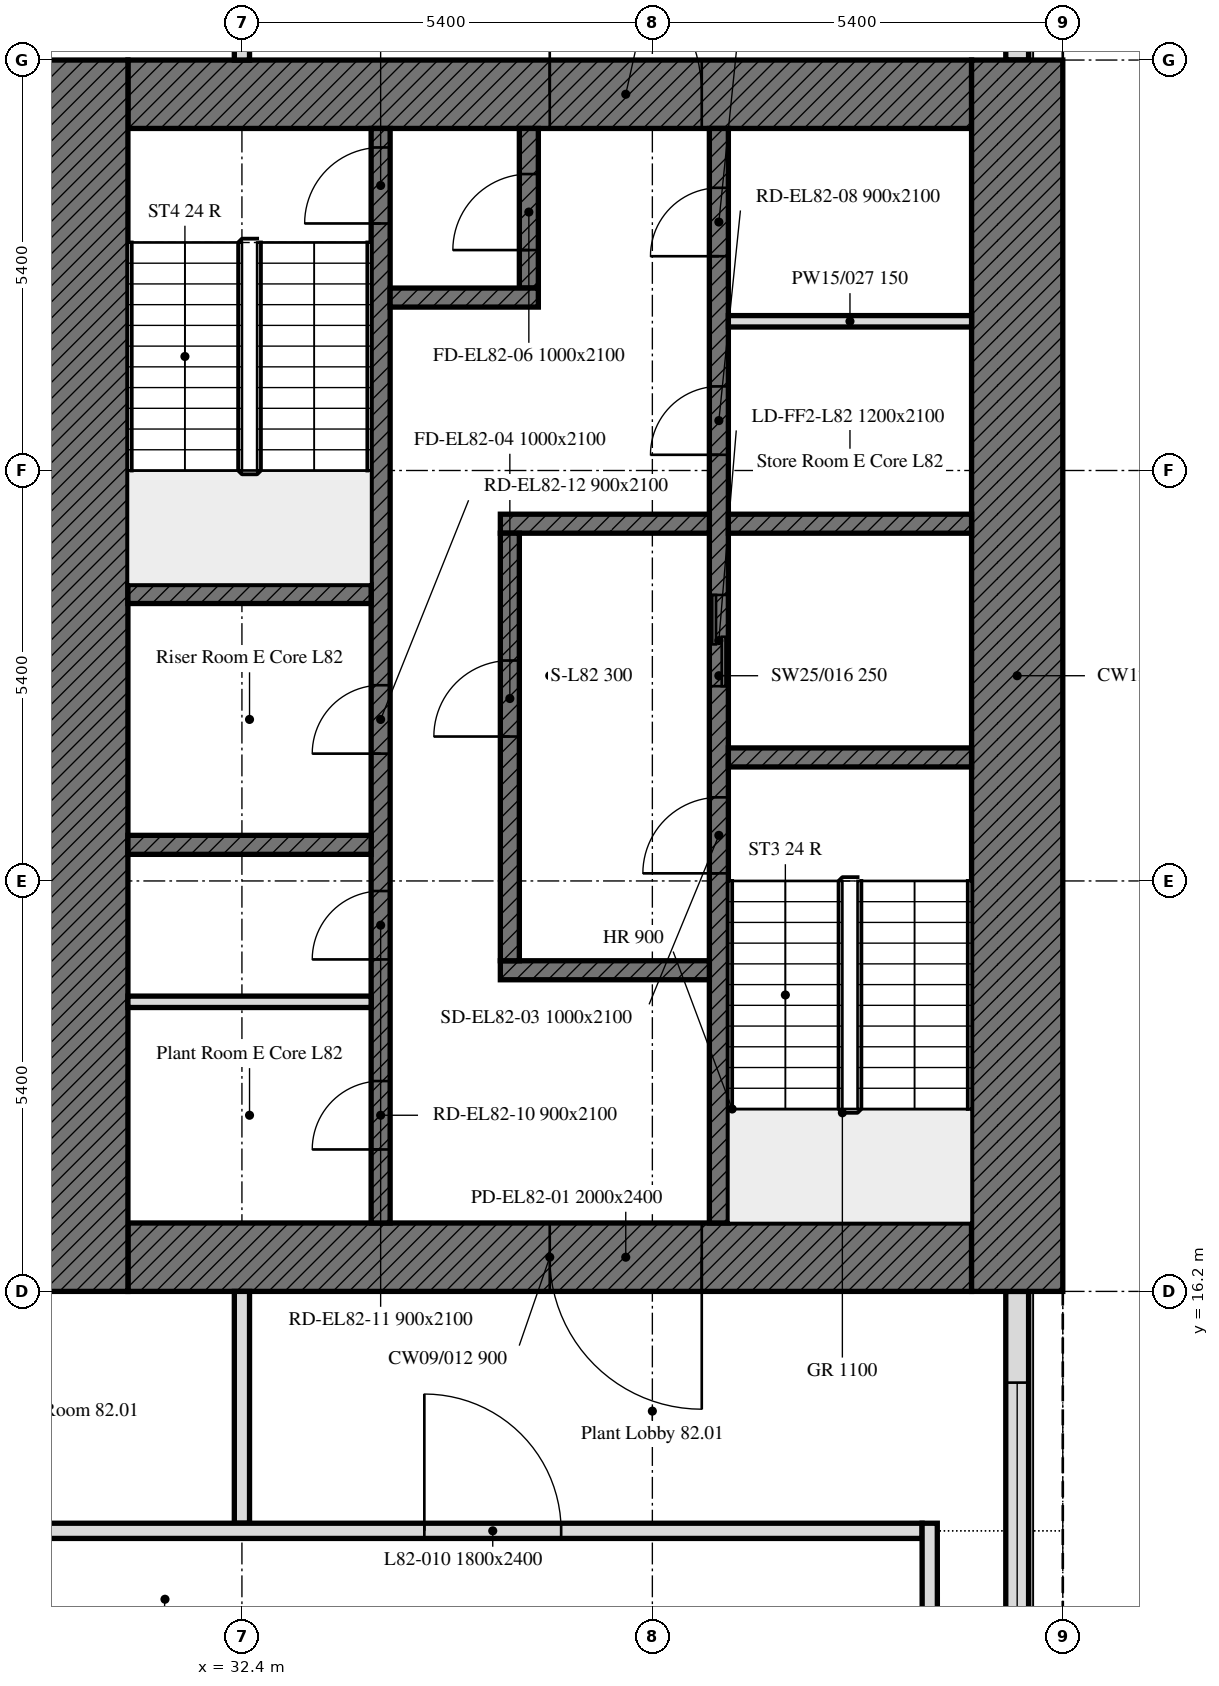
"""IFC4 building model, lengths in metres.
Left out: names, types, materials, properties, quantities, classifications, styles, units other than length and angle.
Written with IfcOpenShell. Run it as: python <this file> out.ifc"""

import sys

from ifc_helpers import new_model, si_unit, direction, frame, frame_2d, origin, place, context, subcontext, project, spatial, polyline, rectangle, outline, extrude, element, fill, save


model = new_model("IFC4")
c1 = context("Model", 3, precision=1e-05, world=origin(), true_north=direction((0.0, 1.0)))
c2 = subcontext(c1, "Body", "Model", "MODEL_VIEW")
j1 = project(units=[si_unit("LENGTHUNIT", "METRE"), si_unit("PLANEANGLEUNIT", "RADIAN")], contexts=[c1])
p1 = place(None, origin())
s1 = spatial("IfcSite", under=j1, at=p1, CompositionType="ELEMENT")
p2 = place(p1, origin())
s2 = spatial("IfcBuilding", under=s1, at=p2, CompositionType="ELEMENT")
p3 = place(p2, frame((0.0, 0.0, 330.7)))
s3 = spatial("IfcBuildingStorey", under=s2, at=p3, CompositionType="ELEMENT", Elevation=330.7)
p4 = place(p3, frame((42.6, 10.986, 0.0), z_axis=(0.0, 0.0, 1.0), x_axis=(0.0, 1.0, 0.0)))
e1 = element("IfcWall", 1, at=p4, inside=s3, PredefinedType="SOLIDWALL", context=c2, shape_type="SweptSolid", body=[
    extrude(outline(polyline([(0.0, 0.0), (5.214, 0.0), (5.214, 4.2), (4.634, 4.2), (4.055, 4.2), (3.476, 4.2), (2.896, 4.2), (2.317, 4.2), (1.738, 4.2), (1.159, 4.2), (0.579, 4.2), (0.0, 4.2), (0.0, 0.0)])), frame((0.0, 0.15, 0.0), z_axis=(0.0, -1.0, 0.0), x_axis=(1.0, 0.0, 0.0)), (0.0, 0.0, 1.0), 0.3),
])
p5 = place(p4, frame((1.014, 0.0, 0.6)))
e2 = element("IfcOpeningElement", 2, at=p5, cuts=e1, PredefinedType="OPENING", context=c2, shape_type="SweptSolid", body=[
    extrude(rectangle(XDim=3.0, YDim=1.8, at=frame_2d((1.5, 0.9))), frame((0.0, 0.16, 0.0), z_axis=(0.0, -1.0, 0.0), x_axis=(1.0, 0.0, 0.0)), (0.0, 0.0, 1.0), 0.32),
])
p6 = place(p3, frame((42.6, 32.4, 0.0), z_axis=(0.0, 0.0, 1.0), x_axis=(0.0, 1.0, 0.0)))
e3 = element("IfcWall", 3, at=p6, inside=s3, PredefinedType="SOLIDWALL", context=c2, shape_type="SweptSolid", body=[
    extrude(outline(polyline([(0.0, 0.0), (10.614, 0.0), (10.614, 4.2), (10.024, 4.2), (9.434, 4.2), (8.845, 4.2), (8.255, 4.2), (7.665, 4.2), (7.076, 4.2), (6.486, 4.2), (5.896, 4.2), (5.307, 4.2), (4.717, 4.2), (4.127, 4.2), (3.538, 4.2), (2.948, 4.2), (2.359, 4.2), (1.769, 4.2), (1.179, 4.2), (0.59, 4.2), (0.0, 4.2), (0.0, 0.0)])), frame((0.0, 0.15, 0.0), z_axis=(0.0, -1.0, 0.0), x_axis=(1.0, 0.0, 0.0)), (0.0, 0.0, 1.0), 0.3),
])
p7 = place(p6, frame((1.2, 0.0, 0.6)))
e4 = element("IfcOpeningElement", 4, at=p7, cuts=e3, PredefinedType="OPENING", context=c2, shape_type="SweptSolid", body=[
    extrude(rectangle(XDim=3.0, YDim=1.8, at=frame_2d((1.5, 0.9))), frame((0.0, 0.16, 0.0), z_axis=(0.0, -1.0, 0.0), x_axis=(1.0, 0.0, 0.0)), (0.0, 0.0, 1.0), 0.32),
])
p8 = place(p6, frame((7.396, 0.0, 0.6)))
e5 = element("IfcOpeningElement", 5, at=p8, cuts=e3, PredefinedType="OPENING", context=c2, shape_type="SweptSolid", body=[
    extrude(rectangle(XDim=1.4, YDim=1.8, at=frame_2d((0.7, 0.9))), frame((0.0, 0.16, 0.0), z_axis=(0.0, -1.0, 0.0), x_axis=(1.0, 0.0, 0.0)), (0.0, 0.0, 1.0), 0.32),
])
p9 = place(p3, frame((42.0, 16.65, 0.0), z_axis=(0.0, 0.0, 1.0), x_axis=(-1.0, 0.0, 0.0)))
e6 = element("IfcWall", 6, at=p9, inside=s3, PredefinedType="SOLIDWALL", context=c2, shape_type="SweptSolid", body=[
    extrude(rectangle(XDim=11.1, YDim=0.9, at=frame_2d((5.55, 0.0))), origin(), (0.0, 0.0, 1.0), 4.2),
])
p10 = place(p9, frame((3.55, 0.0, 0.0)))
e7 = element("IfcOpeningElement", 7, at=p10, cuts=e6, PredefinedType="OPENING", context=c2, shape_type="SweptSolid", body=[
    extrude(rectangle(XDim=2.0, YDim=2.4, at=frame_2d((1.0, 1.2))), frame((0.0, 0.45, 0.0), z_axis=(0.0, -1.0, 0.0), x_axis=(1.0, 0.0, 0.0)), (0.0, 0.0, 1.0), 0.9),
])
p11 = place(p3, frame((30.9, 31.95, 0.0), z_axis=(0.0, 0.0, 1.0), x_axis=(1.0, 0.0, 0.0)))
e8 = element("IfcWall", 8, at=p11, inside=s3, PredefinedType="SOLIDWALL", context=c2, shape_type="SweptSolid", body=[
    extrude(rectangle(XDim=11.1, YDim=0.9, at=frame_2d((5.55, 0.0))), origin(), (0.0, 0.0, 1.0), 4.2),
])
p12 = place(p11, frame((5.55, 0.0, 0.0)))
e9 = element("IfcOpeningElement", 9, at=p12, cuts=e8, PredefinedType="OPENING", context=c2, shape_type="SweptSolid", body=[
    extrude(rectangle(XDim=2.0, YDim=2.4, at=frame_2d((1.0, 1.2))), frame((0.0, 0.45, 0.0), z_axis=(0.0, -1.0, 0.0), x_axis=(1.0, 0.0, 0.0)), (0.0, 0.0, 1.0), 0.9),
])
for number, where, z_axis, x_axis in (
    (10, (42.6, 32.4, 0.0), (0.0, 0.0, 1.0), (0.0, -1.0, 0.0)),
    (11, (30.3, 16.2, 0.0), (0.0, 0.0, 1.0), (0.0, 1.0, 0.0)),
):
    element("IfcWall", number, at=place(p3, frame(where, z_axis=z_axis, x_axis=x_axis)), inside=s3, PredefinedType="SOLIDWALL", context=c2, shape_type="SweptSolid", body=[
        extrude(rectangle(XDim=16.2, YDim=1.2, at=frame_2d((8.1, 0.0))), origin(), (0.0, 0.0, 1.0), 4.2),
    ])
p13 = place(p3, frame((38.675, 17.1, 0.0), z_axis=(0.0, 0.0, 1.0), x_axis=(0.0, 1.0, 0.0)))
e12 = element("IfcWall", 12, at=p13, inside=s3, PredefinedType="SOLIDWALL", context=c2, shape_type="SweptSolid", body=[
    extrude(rectangle(XDim=14.4, YDim=0.25, at=frame_2d((7.2, 0.0))), origin(), (0.0, 0.0, 1.0), 4.2),
])
p14 = place(p13, frame((4.6, 0.0, 0.0)))
e13 = element("IfcOpeningElement", 13, at=p14, cuts=e12, PredefinedType="OPENING", context=c2, shape_type="SweptSolid", body=[
    extrude(rectangle(XDim=1.0, YDim=2.1, at=frame_2d((0.5, 1.05))), frame((0.0, 0.125, 0.0), z_axis=(0.0, -1.0, 0.0), x_axis=(1.0, 0.0, 0.0)), (0.0, 0.0, 1.0), 0.25),
])
p15 = place(p13, frame((7.062, 0.0, 0.0)))
e14 = element("IfcOpeningElement", 14, at=p15, cuts=e12, PredefinedType="OPENING", context=c2, shape_type="SweptSolid", body=[
    extrude(rectangle(XDim=1.2, YDim=2.1, at=frame_2d((0.6, 1.05))), frame((0.0, 0.125, 0.0), z_axis=(0.0, -1.0, 0.0), x_axis=(1.0, 0.0, 0.0)), (0.0, 0.0, 1.0), 0.25),
])
p16 = place(p13, frame((10.106, 0.0, 0.0)))
e15 = element("IfcOpeningElement", 15, at=p16, cuts=e12, PredefinedType="OPENING", context=c2, shape_type="SweptSolid", body=[
    extrude(rectangle(XDim=0.9, YDim=2.1, at=frame_2d((0.45, 1.05))), frame((0.0, 0.125, 0.0), z_axis=(0.0, -1.0, 0.0), x_axis=(1.0, 0.0, 0.0)), (0.0, 0.0, 1.0), 0.25),
])
p17 = place(p13, frame((12.719, 0.0, 0.0)))
e16 = element("IfcOpeningElement", 16, at=p17, cuts=e12, PredefinedType="OPENING", context=c2, shape_type="SweptSolid", body=[
    extrude(rectangle(XDim=0.9, YDim=2.1, at=frame_2d((0.45, 1.05))), frame((0.0, 0.125, 0.0), z_axis=(0.0, -1.0, 0.0), x_axis=(1.0, 0.0, 0.0)), (0.0, 0.0, 1.0), 0.25),
])
p18 = place(p3, frame((34.225, 17.1, 0.0), z_axis=(0.0, 0.0, 1.0), x_axis=(0.0, 1.0, 0.0)))
e17 = element("IfcWall", 17, at=p18, inside=s3, PredefinedType="SOLIDWALL", context=c2, shape_type="SweptSolid", body=[
    extrude(rectangle(XDim=14.4, YDim=0.25, at=frame_2d((7.2, 0.0))), origin(), (0.0, 0.0, 1.0), 4.2),
])
p19 = place(p18, frame((13.15, 0.0, 0.0)))
e18 = element("IfcOpeningElement", 18, at=p19, cuts=e17, PredefinedType="OPENING", context=c2, shape_type="SweptSolid", body=[
    extrude(rectangle(XDim=1.0, YDim=2.1, at=frame_2d((0.5, 1.05))), frame((0.0, 0.125, 0.0), z_axis=(0.0, -1.0, 0.0), x_axis=(1.0, 0.0, 0.0)), (0.0, 0.0, 1.0), 0.25),
])
p20 = place(p18, frame((0.968, 0.0, 0.0)))
e19 = element("IfcOpeningElement", 19, at=p20, cuts=e17, PredefinedType="OPENING", context=c2, shape_type="SweptSolid", body=[
    extrude(rectangle(XDim=0.9, YDim=2.1, at=frame_2d((0.45, 1.05))), frame((0.0, 0.125, 0.0), z_axis=(0.0, -1.0, 0.0), x_axis=(1.0, 0.0, 0.0)), (0.0, 0.0, 1.0), 0.25),
])
p21 = place(p18, frame((3.468, 0.0, 0.0)))
e20 = element("IfcOpeningElement", 20, at=p21, cuts=e17, PredefinedType="OPENING", context=c2, shape_type="SweptSolid", body=[
    extrude(rectangle(XDim=0.9, YDim=2.1, at=frame_2d((0.45, 1.05))), frame((0.0, 0.125, 0.0), z_axis=(0.0, -1.0, 0.0), x_axis=(1.0, 0.0, 0.0)), (0.0, 0.0, 1.0), 0.25),
])
p22 = place(p18, frame((6.175, 0.0, 0.0)))
e21 = element("IfcOpeningElement", 21, at=p22, cuts=e17, PredefinedType="OPENING", context=c2, shape_type="SweptSolid", body=[
    extrude(rectangle(XDim=0.9, YDim=2.1, at=frame_2d((0.45, 1.05))), frame((0.0, 0.125, 0.0), z_axis=(0.0, -1.0, 0.0), x_axis=(1.0, 0.0, 0.0)), (0.0, 0.0, 1.0), 0.25),
])
p23 = place(p3, frame((38.8, 23.225, 0.0), z_axis=(0.0, 0.0, 1.0), x_axis=(1.0, 0.0, 0.0)))
e22 = element("IfcWall", 22, at=p23, inside=s3, PredefinedType="SOLIDWALL", context=c2, shape_type="SweptSolid", body=[
    extrude(rectangle(XDim=3.2, YDim=0.25, at=frame_2d((1.6, 0.0))), origin(), (0.0, 0.0, 1.0), 4.2),
])
for number, where, z_axis, x_axis in (
    (23, (30.9, 25.375, 0.0), (0.0, 0.0, 1.0), (1.0, 0.0, 0.0)),
    (24, (30.9, 22.075, 0.0), (0.0, 0.0, 1.0), (1.0, 0.0, 0.0)),
):
    element("IfcWall", number, at=place(p3, frame(where, z_axis=z_axis, x_axis=x_axis)), inside=s3, PredefinedType="SOLIDWALL", context=c2, shape_type="SweptSolid", body=[
        extrude(rectangle(XDim=3.2, YDim=0.25, at=frame_2d((1.6, 0.0))), origin(), (0.0, 0.0, 1.0), 4.2),
    ])
p24 = place(p3, frame((38.8, 26.3, 0.0), z_axis=(0.0, 0.0, 1.0), x_axis=(1.0, 0.0, 0.0)))
e25 = element("IfcWall", 25, at=p24, inside=s3, PredefinedType="SOLIDWALL", context=c2, shape_type="SweptSolid", body=[
    extrude(rectangle(XDim=3.2, YDim=0.25, at=frame_2d((1.6, 0.0))), origin(), (0.0, 0.0, 1.0), 4.2),
])
for number, where, z_axis, x_axis in (
    (26, (35.8, 26.3, 0.0), (0.0, 0.0, 1.0), (1.0, 0.0, 0.0)),
    (27, (35.8, 20.425, 0.0), (0.0, 0.0, 1.0), (1.0, 0.0, 0.0)),
):
    element("IfcWall", number, at=place(p3, frame(where, z_axis=z_axis, x_axis=x_axis)), inside=s3, PredefinedType="SOLIDWALL", context=c2, shape_type="SweptSolid", body=[
        extrude(rectangle(XDim=2.75, YDim=0.25, at=frame_2d((1.375, 0.0))), origin(), (0.0, 0.0, 1.0), 4.2),
    ])
p25 = place(p3, frame((36.175, 29.4, 0.0), z_axis=(0.0, 0.0, 1.0), x_axis=(0.0, 1.0, 0.0)))
e28 = element("IfcWall", 28, at=p25, inside=s3, PredefinedType="SOLIDWALL", context=c2, shape_type="SweptSolid", body=[
    extrude(rectangle(XDim=2.1, YDim=0.25, at=frame_2d((1.05, 0.0))), origin(), (0.0, 0.0, 1.0), 4.2),
])
p26 = place(p25, frame((0.5, 0.0, 0.0)))
e29 = element("IfcOpeningElement", 29, at=p26, cuts=e28, PredefinedType="OPENING", context=c2, shape_type="SweptSolid", body=[
    extrude(rectangle(XDim=1.0, YDim=2.1, at=frame_2d((0.5, 1.05))), frame((0.0, 0.125, 0.0), z_axis=(0.0, -1.0, 0.0), x_axis=(1.0, 0.0, 0.0)), (0.0, 0.0, 1.0), 0.25),
])
p27 = place(p3, frame((34.35, 29.275, 0.0), z_axis=(0.0, 0.0, 1.0), x_axis=(1.0, 0.0, 0.0)))
e30 = element("IfcWall", 30, at=p27, inside=s3, PredefinedType="SOLIDWALL", context=c2, shape_type="SweptSolid", body=[
    extrude(rectangle(XDim=1.95, YDim=0.25, at=frame_2d((0.975, 0.0))), origin(), (0.0, 0.0, 1.0), 4.2),
])
p28 = place(p3, frame((35.925, 20.55, 0.0), z_axis=(0.0, 0.0, 1.0), x_axis=(0.0, 1.0, 0.0)))
e31 = element("IfcWall", 31, at=p28, inside=s3, PredefinedType="SOLIDWALL", context=c2, shape_type="SweptSolid", body=[
    extrude(rectangle(XDim=5.625, YDim=0.25, at=frame_2d((2.812, 0.0))), origin(), (0.0, 0.0, 1.0), 4.2),
])
p29 = place(p28, frame((2.95, 0.0, 0.0)))
e32 = element("IfcOpeningElement", 32, at=p29, cuts=e31, PredefinedType="OPENING", context=c2, shape_type="SweptSolid", body=[
    extrude(rectangle(XDim=1.0, YDim=2.1, at=frame_2d((0.5, 1.05))), frame((0.0, 0.125, 0.0), z_axis=(0.0, -1.0, 0.0), x_axis=(1.0, 0.0, 0.0)), (0.0, 0.0, 1.0), 0.25),
])
p30 = place(p3, frame((38.8, 28.963, 0.0), z_axis=(0.0, 0.0, 1.0), x_axis=(1.0, 0.0, 0.0)))
e33 = element("IfcWall", 33, at=p30, inside=s3, PredefinedType="PARTITIONING", context=c2, shape_type="SweptSolid", body=[
    extrude(rectangle(XDim=3.2, YDim=0.15, at=frame_2d((1.6, 0.0))), origin(), (0.0, 0.0, 1.0), 4.2),
])
p31 = place(p3, frame((30.9, 20.01, 0.0), z_axis=(0.0, 0.0, 1.0), x_axis=(1.0, 0.0, 0.0)))
e34 = element("IfcWall", 34, at=p31, inside=s3, PredefinedType="PARTITIONING", context=c2, shape_type="SweptSolid", body=[
    extrude(rectangle(XDim=3.2, YDim=0.15, at=frame_2d((1.6, 0.0))), origin(), (0.0, 0.0, 1.0), 4.2),
])
p32 = place(p3, frame((32.4, 32.4, 0.0), z_axis=(0.0, 0.0, 1.0), x_axis=(0.0, 1.0, 0.0)))
e35 = element("IfcWall", 35, at=p32, inside=s3, PredefinedType="PARTITIONING", context=c2, shape_type="SweptSolid", body=[
    extrude(rectangle(XDim=5.105, YDim=0.2, at=frame_2d((2.552, 0.0))), origin(), (0.0, 0.0, 1.0), 3.45),
])
p33 = place(p3, frame((32.4, 13.15, 0.0), z_axis=(0.0, 0.0, 1.0), x_axis=(0.0, 1.0, 0.0)))
e36 = element("IfcWall", 36, at=p33, inside=s3, PredefinedType="PARTITIONING", context=c2, shape_type="SweptSolid", body=[
    extrude(rectangle(XDim=3.05, YDim=0.2, at=frame_2d((1.525, 0.0))), origin(), (0.0, 0.0, 1.0), 4.2),
])
p34 = place(p3, frame((29.7, 13.05, 0.0), z_axis=(0.0, 0.0, 1.0), x_axis=(1.0, 0.0, 0.0)))
e37 = element("IfcWall", 37, at=p34, inside=s3, PredefinedType="PARTITIONING", context=c2, shape_type="SweptSolid", body=[
    extrude(rectangle(XDim=11.649, YDim=0.2, at=frame_2d((5.825, 0.0))), origin(), (0.0, 0.0, 1.0), 4.2),
])
p35 = place(p34, frame((5.1, 0.0, 0.0)))
e38 = element("IfcOpeningElement", 38, at=p35, cuts=e37, PredefinedType="OPENING", context=c2, shape_type="SweptSolid", body=[
    extrude(rectangle(XDim=1.8, YDim=2.4, at=frame_2d((0.9, 1.2))), frame((0.0, 0.1, 0.0), z_axis=(0.0, -1.0, 0.0), x_axis=(1.0, 0.0, 0.0)), (0.0, 0.0, 1.0), 0.2),
])
p36 = place(p3, frame((41.449, 13.15, 0.0), z_axis=(0.0, 0.0, 1.0), x_axis=(0.00085543168, -0.999999634118, 0.0)))
e39 = element("IfcWall", 39, at=p36, inside=s3, PredefinedType="PARTITIONING", context=c2, shape_type="SweptSolid", body=[
    extrude(rectangle(XDim=1.427, YDim=0.2, at=frame_2d((0.713, 0.0))), origin(), (0.0, 0.0, 1.0), 4.2),
])
p37 = place(p5, origin())
e40 = element("IfcWindow", 40, at=p37, inside=s3, PartitioningType="SINGLE_PANEL", PredefinedType="WINDOW", context=c2, shape_type="SweptSolid", body=[
    extrude(rectangle(XDim=3.0, YDim=1.8, at=frame_2d((1.5, 0.9))), frame((0.0, 0.03, 0.0), z_axis=(0.0, -1.0, 0.0), x_axis=(1.0, 0.0, 0.0)), (0.0, 0.0, 1.0), 0.06),
])
fill(e2, e40)
p38 = place(p10, origin())
e41 = element("IfcDoor", 41, at=p38, inside=s3, OperationType="DOUBLE_DOOR_SINGLE_SWING", PredefinedType="DOOR", context=c2, shape_type="SweptSolid", body=[
    extrude(rectangle(XDim=2.0, YDim=2.4, at=frame_2d((1.0, 1.2))), frame((0.0, 0.025, 0.0), z_axis=(0.0, -1.0, 0.0), x_axis=(1.0, 0.0, 0.0)), (0.0, 0.0, 1.0), 0.05),
])
fill(e7, e41)
p39 = place(p12, origin())
e42 = element("IfcDoor", 42, at=p39, inside=s3, OperationType="DOUBLE_DOOR_SINGLE_SWING", PredefinedType="DOOR", context=c2, shape_type="SweptSolid", body=[
    extrude(rectangle(XDim=2.0, YDim=2.4, at=frame_2d((1.0, 1.2))), frame((0.0, 0.025, 0.0), z_axis=(0.0, -1.0, 0.0), x_axis=(1.0, 0.0, 0.0)), (0.0, 0.0, 1.0), 0.05),
])
fill(e9, e42)
p40 = place(p14, origin())
e43 = element("IfcDoor", 43, at=p40, inside=s3, OperationType="SINGLE_SWING_LEFT", PredefinedType="DOOR", context=c2, shape_type="SweptSolid", body=[
    extrude(rectangle(XDim=1.0, YDim=2.1, at=frame_2d((0.5, 1.05))), frame((0.0, 0.025, 0.0), z_axis=(0.0, -1.0, 0.0), x_axis=(1.0, 0.0, 0.0)), (0.0, 0.0, 1.0), 0.05),
])
fill(e13, e43)
p41 = place(p29, origin())
e44 = element("IfcDoor", 44, at=p41, inside=s3, OperationType="SINGLE_SWING_LEFT", PredefinedType="DOOR", context=c2, shape_type="SweptSolid", body=[
    extrude(rectangle(XDim=1.0, YDim=2.1, at=frame_2d((0.5, 1.05))), frame((0.0, 0.025, 0.0), z_axis=(0.0, -1.0, 0.0), x_axis=(1.0, 0.0, 0.0)), (0.0, 0.0, 1.0), 0.05),
])
fill(e32, e44)
p42 = place(p19, origin())
e45 = element("IfcDoor", 45, at=p42, inside=s3, OperationType="SINGLE_SWING_LEFT", PredefinedType="DOOR", context=c2, shape_type="SweptSolid", body=[
    extrude(rectangle(XDim=1.0, YDim=2.1, at=frame_2d((0.5, 1.05))), frame((0.0, 0.025, 0.0), z_axis=(0.0, -1.0, 0.0), x_axis=(1.0, 0.0, 0.0)), (0.0, 0.0, 1.0), 0.05),
])
fill(e18, e45)
p43 = place(p26, origin())
e46 = element("IfcDoor", 46, at=p43, inside=s3, OperationType="SINGLE_SWING_LEFT", PredefinedType="DOOR", context=c2, shape_type="SweptSolid", body=[
    extrude(rectangle(XDim=1.0, YDim=2.1, at=frame_2d((0.5, 1.05))), frame((0.0, 0.025, 0.0), z_axis=(0.0, -1.0, 0.0), x_axis=(1.0, 0.0, 0.0)), (0.0, 0.0, 1.0), 0.05),
])
fill(e29, e46)
p44 = place(p15, origin())
e47 = element("IfcDoor", 47, at=p44, inside=s3, OperationType="DOUBLE_DOOR_SLIDING", PredefinedType="DOOR", context=c2, shape_type="SweptSolid", body=[
    extrude(rectangle(XDim=1.2, YDim=2.1, at=frame_2d((0.6, 1.05))), frame((0.0, 0.025, 0.0), z_axis=(0.0, -1.0, 0.0), x_axis=(1.0, 0.0, 0.0)), (0.0, 0.0, 1.0), 0.05),
])
fill(e14, e47)
p45 = place(p16, origin())
e48 = element("IfcDoor", 48, at=p45, inside=s3, OperationType="SINGLE_SWING_LEFT", PredefinedType="DOOR", context=c2, shape_type="SweptSolid", body=[
    extrude(rectangle(XDim=0.9, YDim=2.1, at=frame_2d((0.45, 1.05))), frame((0.0, 0.025, 0.0), z_axis=(0.0, -1.0, 0.0), x_axis=(1.0, 0.0, 0.0)), (0.0, 0.0, 1.0), 0.05),
])
fill(e15, e48)
p46 = place(p17, origin())
e49 = element("IfcDoor", 49, at=p46, inside=s3, OperationType="SINGLE_SWING_LEFT", PredefinedType="DOOR", context=c2, shape_type="SweptSolid", body=[
    extrude(rectangle(XDim=0.9, YDim=2.1, at=frame_2d((0.45, 1.05))), frame((0.0, 0.025, 0.0), z_axis=(0.0, -1.0, 0.0), x_axis=(1.0, 0.0, 0.0)), (0.0, 0.0, 1.0), 0.05),
])
fill(e16, e49)
p47 = place(p20, origin())
e50 = element("IfcDoor", 50, at=p47, inside=s3, OperationType="SINGLE_SWING_LEFT", PredefinedType="DOOR", context=c2, shape_type="SweptSolid", body=[
    extrude(rectangle(XDim=0.9, YDim=2.1, at=frame_2d((0.45, 1.05))), frame((0.0, 0.025, 0.0), z_axis=(0.0, -1.0, 0.0), x_axis=(1.0, 0.0, 0.0)), (0.0, 0.0, 1.0), 0.05),
])
fill(e19, e50)
p48 = place(p21, origin())
e51 = element("IfcDoor", 51, at=p48, inside=s3, OperationType="SINGLE_SWING_LEFT", PredefinedType="DOOR", context=c2, shape_type="SweptSolid", body=[
    extrude(rectangle(XDim=0.9, YDim=2.1, at=frame_2d((0.45, 1.05))), frame((0.0, 0.025, 0.0), z_axis=(0.0, -1.0, 0.0), x_axis=(1.0, 0.0, 0.0)), (0.0, 0.0, 1.0), 0.05),
])
fill(e20, e51)
p49 = place(p22, origin())
e52 = element("IfcDoor", 52, at=p49, inside=s3, OperationType="SINGLE_SWING_LEFT", PredefinedType="DOOR", context=c2, shape_type="SweptSolid", body=[
    extrude(rectangle(XDim=0.9, YDim=2.1, at=frame_2d((0.45, 1.05))), frame((0.0, 0.025, 0.0), z_axis=(0.0, -1.0, 0.0), x_axis=(1.0, 0.0, 0.0)), (0.0, 0.0, 1.0), 0.05),
])
fill(e21, e52)
p50 = place(p35, origin())
e53 = element("IfcDoor", 53, at=p50, inside=s3, OperationType="DOUBLE_DOOR_SINGLE_SWING", PredefinedType="DOOR", context=c2, shape_type="SweptSolid", body=[
    extrude(rectangle(XDim=1.8, YDim=2.4, at=frame_2d((0.9, 1.2))), frame((0.0, 0.025, 0.0), z_axis=(0.0, -1.0, 0.0), x_axis=(1.0, 0.0, 0.0)), (0.0, 0.0, 1.0), 0.05),
])
fill(e38, e53)
save(model, sys.argv[1])
